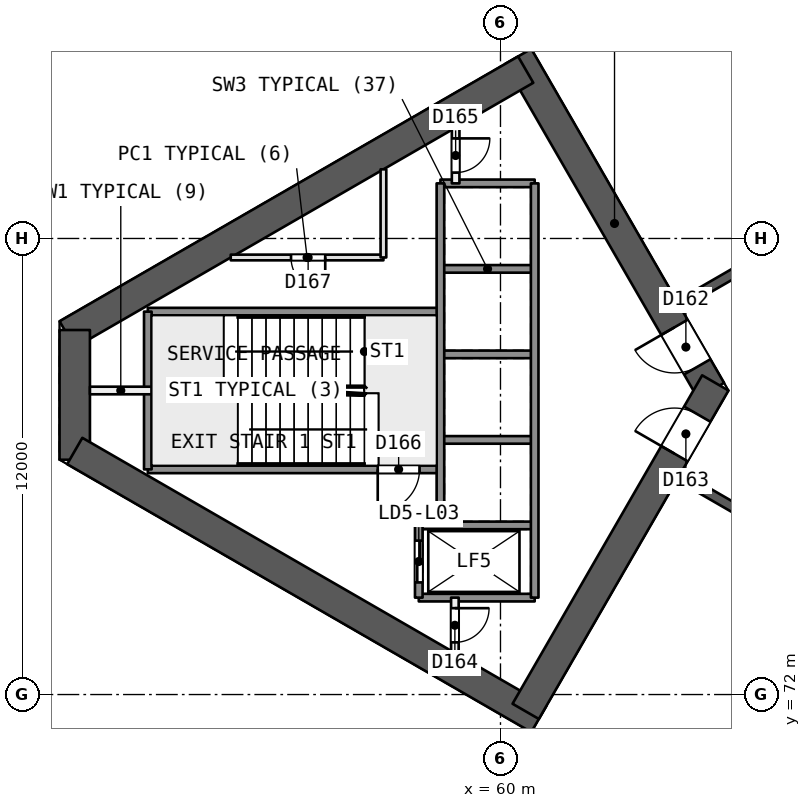
"""IFC4 building model, lengths in metres.
Left out: names, types, materials, properties, quantities, classifications, styles, units other than length and angle.
Written with IfcOpenShell. Run it as: python <this file> out.ifc"""

import sys

from ifc_helpers import new_model, si_unit, direction, frame, frame_2d, origin, place, context, subcontext, project, spatial, rectangle, extrude, element, fill, save


model = new_model("IFC4")
c1 = context("Model", 3, precision=1e-05, world=origin(), true_north=direction((0.0, 1.0)))
c2 = subcontext(c1, "Body", "Model", "MODEL_VIEW")
j1 = project(units=[si_unit("LENGTHUNIT", "METRE"), si_unit("PLANEANGLEUNIT", "RADIAN")], contexts=[c1])
p1 = place(None, origin())
s1 = spatial("IfcSite", under=j1, at=p1, CompositionType="ELEMENT")
p2 = place(p1, origin())
s2 = spatial("IfcBuilding", under=s1, at=p2, CompositionType="ELEMENT")
p3 = place(p2, frame((0.0, 0.0, 20.4)))
s3 = spatial("IfcBuildingStorey", under=s2, at=p3, CompositionType="ELEMENT", Elevation=20.4)
p4 = place(p3, frame((65.538, 80.0, 0.0), z_axis=(0.0, 0.0, 1.0), x_axis=(-0.49999662545, 0.866027352073, 0.0)))
e1 = element("IfcWall", 1, at=p4, inside=s3, PredefinedType="SHEAR", context=c2, shape_type="SweptSolid", body=[
    extrude(rectangle(XDim=10.149, YDim=0.8, at=frame_2d((5.074, 0.0))), origin(), (0.0, 0.0, 1.0), 5.0),
])
p5 = place(p4, frame((0.719, 0.0, 0.0)))
e2 = element("IfcOpeningElement", 2, at=p5, cuts=e1, PredefinedType="OPENING", context=c2, shape_type="SweptSolid", body=[
    extrude(rectangle(XDim=1.2, YDim=2.1, at=frame_2d((0.6, 1.05))), frame((0.0, 0.411, 0.0), z_axis=(0.0, -1.0, 0.0), x_axis=(1.0, 0.0, 0.0)), (0.0, 0.0, 1.0), 0.821),
])
p6 = place(p3, frame((60.664, 88.443, 0.0), z_axis=(0.0, 0.0, 1.0), x_axis=(-0.866029478545, -0.499992942241, 0.0)))
e3 = element("IfcWall", 3, at=p6, inside=s3, PredefinedType="SHEAR", context=c2, shape_type="SweptSolid", body=[
    extrude(rectangle(XDim=13.933, YDim=0.8, at=frame_2d((6.967, 0.0))), origin(), (0.0, 0.0, 1.0), 5.0),
])
p7 = place(p3, frame((48.797, 81.592, 0.0), z_axis=(0.0, 0.0, 1.0), x_axis=(0.0, -1.0, 0.0)))
e4 = element("IfcWall", 4, at=p7, inside=s3, PredefinedType="SHEAR", context=c2, shape_type="SweptSolid", body=[
    extrude(rectangle(XDim=3.415, YDim=0.8, at=frame_2d((1.707, 0.0))), origin(), (0.0, 0.0, 1.0), 5.0),
])
p8 = place(p3, frame((48.797, 78.408, 0.0), z_axis=(0.0, 0.0, 1.0), x_axis=(0.866032504327, -0.499987701298, 0.0)))
e5 = element("IfcWall", 5, at=p8, inside=s3, PredefinedType="SHEAR", context=c2, shape_type="SweptSolid", body=[
    extrude(rectangle(XDim=14.102, YDim=0.8, at=frame_2d((7.051, 0.0))), origin(), (0.0, 0.0, 1.0), 5.0),
])
p9 = place(p3, frame((60.664, 71.557, 0.0), z_axis=(0.0, 0.0, 1.0), x_axis=(0.50000409368, 0.866023040284, 0.0)))
e6 = element("IfcWall", 6, at=p9, inside=s3, PredefinedType="SHEAR", context=c2, shape_type="SweptSolid", body=[
    extrude(rectangle(XDim=9.98, YDim=0.8, at=frame_2d((4.99, 0.0))), origin(), (0.0, 0.0, 1.0), 5.0),
])
p10 = place(p9, frame((7.83, 0.0, 0.0)))
e7 = element("IfcOpeningElement", 7, at=p10, cuts=e6, PredefinedType="OPENING", context=c2, shape_type="SweptSolid", body=[
    extrude(rectangle(XDim=1.2, YDim=2.1, at=frame_2d((0.6, 1.05))), frame((0.0, 0.411, 0.0), z_axis=(0.0, -1.0, 0.0), x_axis=(1.0, 0.0, 0.0)), (0.0, 0.0, 1.0), 0.821),
])
p11 = place(p3, frame((78.2, 90.046, 0.0), z_axis=(0.0, 0.0, 1.0), x_axis=(-0.866026492143, -0.499998114903, 0.0)))
e8 = element("IfcWall", 8, at=p11, inside=s3, PredefinedType="SHEAR", context=c2, shape_type="SweptSolid", body=[
    extrude(rectangle(XDim=15.588, YDim=0.25, at=frame_2d((7.794, 0.0))), origin(), (0.0, 0.0, 1.0), 4.5),
])
p12 = place(p11, frame((2.518, 0.0, 0.0)))
e9 = element("IfcOpeningElement", 9, at=p12, cuts=e8, PredefinedType="OPENING", context=c2, shape_type="SweptSolid", body=[
    extrude(rectangle(XDim=1.2, YDim=2.4, at=frame_2d((0.6, 1.2))), frame((0.0, 0.135, 0.0), z_axis=(0.0, -1.0, 0.0), x_axis=(1.0, 0.0, 0.0)), (0.0, 0.0, 1.0), 0.271),
])
p13 = place(p11, frame((6.487, 0.0, 0.0)))
e10 = element("IfcOpeningElement", 10, at=p13, cuts=e8, PredefinedType="OPENING", context=c2, shape_type="SweptSolid", body=[
    extrude(rectangle(XDim=0.9, YDim=2.1, at=frame_2d((0.45, 1.05))), frame((0.0, 0.135, 0.0), z_axis=(0.0, -1.0, 0.0), x_axis=(1.0, 0.0, 0.0)), (0.0, 0.0, 1.0), 0.271),
])
p14 = place(p11, frame((7.89, 0.0, 0.0)))
e11 = element("IfcOpeningElement", 11, at=p14, cuts=e8, PredefinedType="OPENING", context=c2, shape_type="SweptSolid", body=[
    extrude(rectangle(XDim=0.9, YDim=2.1, at=frame_2d((0.45, 1.05))), frame((0.0, 0.135, 0.0), z_axis=(0.0, -1.0, 0.0), x_axis=(1.0, 0.0, 0.0)), (0.0, 0.0, 1.0), 0.271),
])
p15 = place(p11, frame((9.527, 0.0, 0.0)))
e12 = element("IfcOpeningElement", 12, at=p15, cuts=e8, PredefinedType="OPENING", context=c2, shape_type="SweptSolid", body=[
    extrude(rectangle(XDim=0.9, YDim=2.1, at=frame_2d((0.45, 1.05))), frame((0.0, 0.135, 0.0), z_axis=(0.0, -1.0, 0.0), x_axis=(1.0, 0.0, 0.0)), (0.0, 0.0, 1.0), 0.271),
])
p16 = place(p11, frame((12.65, 0.0, 0.0)))
e13 = element("IfcOpeningElement", 13, at=p16, cuts=e8, PredefinedType="OPENING", context=c2, shape_type="SweptSolid", body=[
    extrude(rectangle(XDim=1.2, YDim=2.4, at=frame_2d((0.6, 1.2))), frame((0.0, 0.135, 0.0), z_axis=(0.0, -1.0, 0.0), x_axis=(1.0, 0.0, 0.0)), (0.0, 0.0, 1.0), 0.271),
])
p17 = place(p3, frame((64.7, 77.748, 0.0), z_axis=(0.0, 0.0, 1.0), x_axis=(0.866026492143, -0.499998114903, 0.0)))
e14 = element("IfcWall", 14, at=p17, inside=s3, PredefinedType="SHEAR", context=c2, shape_type="SweptSolid", body=[
    extrude(rectangle(XDim=15.588, YDim=0.25, at=frame_2d((7.794, 0.0))), origin(), (0.0, 0.0, 1.0), 4.5),
])
p18 = place(p17, frame((3.297, 0.0, 0.0)))
e15 = element("IfcOpeningElement", 15, at=p18, cuts=e14, PredefinedType="OPENING", context=c2, shape_type="SweptSolid", body=[
    extrude(rectangle(XDim=1.2, YDim=2.4, at=frame_2d((0.6, 1.2))), frame((0.0, 0.135, 0.0), z_axis=(0.0, -1.0, 0.0), x_axis=(1.0, 0.0, 0.0)), (0.0, 0.0, 1.0), 0.271),
])
p19 = place(p17, frame((9.143, 0.0, 0.0)))
e16 = element("IfcOpeningElement", 16, at=p19, cuts=e14, PredefinedType="OPENING", context=c2, shape_type="SweptSolid", body=[
    extrude(rectangle(XDim=1.2, YDim=2.4, at=frame_2d((0.6, 1.2))), frame((0.0, 0.135, 0.0), z_axis=(0.0, -1.0, 0.0), x_axis=(1.0, 0.0, 0.0)), (0.0, 0.0, 1.0), 0.271),
])
p20 = place(p17, frame((13.04, 0.0, 0.0)))
e17 = element("IfcOpeningElement", 17, at=p20, cuts=e14, PredefinedType="OPENING", context=c2, shape_type="SweptSolid", body=[
    extrude(rectangle(XDim=1.2, YDim=2.4, at=frame_2d((0.6, 1.2))), frame((0.0, 0.135, 0.0), z_axis=(0.0, -1.0, 0.0), x_axis=(1.0, 0.0, 0.0)), (0.0, 0.0, 1.0), 0.271),
])
for number, where, z_axis, x_axis in (
    (18, (60.85, 55.491, 0.0), (0.0, 0.0, 1.0), (0.5, 0.866, 0.0)),
    (19, (64.225, 53.542, 0.0), (0.0, 0.0, 1.0), (0.5, 0.866, 0.0)),
):
    element("IfcWall", number, at=place(p3, frame(where, z_axis=z_axis, x_axis=x_axis)), inside=s3, PredefinedType="PARTITIONING", context=c2, shape_type="SweptSolid", body=[
        extrude(rectangle(XDim=21.201, YDim=0.2, at=frame_2d((10.601, 0.0))), origin(), (0.0, 0.0, 1.0), 4.5),
    ])
p21 = place(p3, frame((26.66, 85.0, 0.0), z_axis=(0.0, 0.0, 1.0), x_axis=(0.866025599265, 0.499999661418, 0.0)))
e20 = element("IfcWall", 20, at=p21, inside=s3, PredefinedType="SOLIDWALL", context=c2, shape_type="SweptSolid", body=[
    extrude(rectangle(XDim=78.727, YDim=0.4, at=frame_2d((39.364, 0.0))), origin(), (0.0, 0.0, 1.0), 4.5),
])
p22 = place(p21, frame((42.84, 0.0, 0.9)))
e21 = element("IfcOpeningElement", 21, at=p22, cuts=e20, PredefinedType="OPENING", context=c2, shape_type="SweptSolid", body=[
    extrude(rectangle(XDim=2.4, YDim=2.4, at=frame_2d((1.2, 1.2))), frame((0.0, 0.21, 0.0), z_axis=(0.0, -1.0, 0.0), x_axis=(1.0, 0.0, 0.0)), (0.0, 0.0, 1.0), 0.421),
])
p23 = place(p21, frame((37.385, 0.0, 0.9)))
e22 = element("IfcOpeningElement", 22, at=p23, cuts=e20, PredefinedType="OPENING", context=c2, shape_type="SweptSolid", body=[
    extrude(rectangle(XDim=2.4, YDim=2.4, at=frame_2d((1.2, 1.2))), frame((0.0, 0.21, 0.0), z_axis=(0.0, -1.0, 0.0), x_axis=(1.0, 0.0, 0.0)), (0.0, 0.0, 1.0), 0.421),
])
p24 = place(p21, frame((32.708, 0.0, 0.9)))
e23 = element("IfcOpeningElement", 23, at=p24, cuts=e20, PredefinedType="OPENING", context=c2, shape_type="SweptSolid", body=[
    extrude(rectangle(XDim=2.4, YDim=2.4, at=frame_2d((1.2, 1.2))), frame((0.0, 0.21, 0.0), z_axis=(0.0, -1.0, 0.0), x_axis=(1.0, 0.0, 0.0)), (0.0, 0.0, 1.0), 0.421),
])
p25 = place(p3, frame((94.84, 35.636, 0.0), z_axis=(0.0, 0.0, 1.0), x_axis=(-0.866025599265, 0.499999661418, 0.0)))
e24 = element("IfcWall", 24, at=p25, inside=s3, PredefinedType="SOLIDWALL", context=c2, shape_type="SweptSolid", body=[
    extrude(rectangle(XDim=78.727, YDim=0.4, at=frame_2d((39.364, 0.0))), origin(), (0.0, 0.0, 1.0), 4.5),
])
p26 = place(p25, frame((42.061, 0.0, 0.9)))
e25 = element("IfcOpeningElement", 25, at=p26, cuts=e24, PredefinedType="OPENING", context=c2, shape_type="SweptSolid", body=[
    extrude(rectangle(XDim=2.4, YDim=2.4, at=frame_2d((1.2, 1.2))), frame((0.0, 0.21, 0.0), z_axis=(0.0, -1.0, 0.0), x_axis=(1.0, 0.0, 0.0)), (0.0, 0.0, 1.0), 0.421),
])
p27 = place(p25, frame((36.215, 0.0, 0.9)))
e26 = element("IfcOpeningElement", 26, at=p27, cuts=e24, PredefinedType="OPENING", context=c2, shape_type="SweptSolid", body=[
    extrude(rectangle(XDim=2.4, YDim=2.4, at=frame_2d((1.2, 1.2))), frame((0.0, 0.21, 0.0), z_axis=(0.0, -1.0, 0.0), x_axis=(1.0, 0.0, 0.0)), (0.0, 0.0, 1.0), 0.421),
])
p28 = place(p25, frame((32.318, 0.0, 0.9)))
e27 = element("IfcOpeningElement", 27, at=p28, cuts=e24, PredefinedType="OPENING", context=c2, shape_type="SweptSolid", body=[
    extrude(rectangle(XDim=2.4, YDim=2.4, at=frame_2d((1.2, 1.2))), frame((0.0, 0.21, 0.0), z_axis=(0.0, -1.0, 0.0), x_axis=(1.0, 0.0, 0.0)), (0.0, 0.0, 1.0), 0.421),
])
p29 = place(p3, frame((60.9, 85.45, 0.0), z_axis=(0.0, 0.0, 1.0), x_axis=(-1.0, 0.0, 0.0)))
e28 = element("IfcWall", 28, at=p29, inside=s3, PredefinedType="SOLIDWALL", context=c2, shape_type="SweptSolid", body=[
    extrude(rectangle(XDim=2.48, YDim=0.2, at=frame_2d((1.24, 0.0))), origin(), (0.0, 0.0, 1.0), 4.5),
])
p30 = place(p3, frame((56.92, 83.5, 0.0), z_axis=(0.0, 0.0, 1.0), x_axis=(-1.0, 0.0, 0.0)))
e29 = element("IfcWall", 29, at=p30, inside=s3, PredefinedType="PARTITIONING", context=c2, shape_type="SweptSolid", body=[
    extrude(rectangle(XDim=4.018, YDim=0.15, at=frame_2d((2.009, 0.0))), origin(), (0.0, 0.0, 1.0), 4.5),
])
p31 = place(p30, frame((1.531, 0.0, 0.0)))
e30 = element("IfcOpeningElement", 30, at=p31, cuts=e29, PredefinedType="OPENING", context=c2, shape_type="SweptSolid", body=[
    extrude(rectangle(XDim=0.9, YDim=2.1, at=frame_2d((0.45, 1.05))), frame((0.0, 0.085, 0.0), z_axis=(0.0, -1.0, 0.0), x_axis=(1.0, 0.0, 0.0)), (0.0, 0.0, 1.0), 0.171),
])
p32 = place(p3, frame((60.9, 83.2, 0.0), z_axis=(0.0, 0.0, 1.0), x_axis=(-1.0, 0.0, 0.0)))
e31 = element("IfcWall", 31, at=p32, inside=s3, PredefinedType="SOLIDWALL", context=c2, shape_type="SweptSolid", body=[
    extrude(rectangle(XDim=2.48, YDim=0.2, at=frame_2d((1.24, 0.0))), origin(), (0.0, 0.0, 1.0), 4.5),
])
p33 = place(p3, frame((58.42, 82.075, 0.0), z_axis=(0.0, 0.0, 1.0), x_axis=(-1.0, 0.0, 0.0)))
e32 = element("IfcWall", 32, at=p33, inside=s3, PredefinedType="SOLIDWALL", context=c2, shape_type="SweptSolid", body=[
    extrude(rectangle(XDim=7.7, YDim=0.2, at=frame_2d((3.85, 0.0))), origin(), (0.0, 0.0, 1.0), 4.5),
])
p34 = place(p3, frame((60.9, 80.95, 0.0), z_axis=(0.0, 0.0, 1.0), x_axis=(-1.0, 0.0, 0.0)))
e33 = element("IfcWall", 33, at=p34, inside=s3, PredefinedType="SOLIDWALL", context=c2, shape_type="SweptSolid", body=[
    extrude(rectangle(XDim=2.48, YDim=0.2, at=frame_2d((1.24, 0.0))), origin(), (0.0, 0.0, 1.0), 4.5),
])
p35 = place(p3, frame((50.82, 80.0, 0.0), z_axis=(0.0, 0.0, 1.0), x_axis=(-1.0, 0.0, 0.0)))
e34 = element("IfcWall", 34, at=p35, inside=s3, PredefinedType="PARTITIONING", context=c2, shape_type="SweptSolid", body=[
    extrude(rectangle(XDim=1.623, YDim=0.2, at=frame_2d((0.812, 0.0))), origin(), (0.0, 0.0, 1.0), 4.5),
])
p36 = place(p3, frame((60.9, 78.7, 0.0), z_axis=(0.0, 0.0, 1.0), x_axis=(-1.0, 0.0, 0.0)))
e35 = element("IfcWall", 35, at=p36, inside=s3, PredefinedType="SOLIDWALL", context=c2, shape_type="SweptSolid", body=[
    extrude(rectangle(XDim=2.48, YDim=0.2, at=frame_2d((1.24, 0.0))), origin(), (0.0, 0.0, 1.0), 4.5),
])
p37 = place(p3, frame((58.42, 77.925, 0.0), z_axis=(0.0, 0.0, 1.0), x_axis=(-1.0, 0.0, 0.0)))
e36 = element("IfcWall", 36, at=p37, inside=s3, PredefinedType="SOLIDWALL", context=c2, shape_type="SweptSolid", body=[
    extrude(rectangle(XDim=7.7, YDim=0.2, at=frame_2d((3.85, 0.0))), origin(), (0.0, 0.0, 1.0), 4.5),
])
p38 = place(p37, frame((0.55, 0.0, 0.0)))
e37 = element("IfcOpeningElement", 37, at=p38, cuts=e36, PredefinedType="OPENING", context=c2, shape_type="SweptSolid", body=[
    extrude(rectangle(XDim=1.1, YDim=2.1, at=frame_2d((0.55, 1.05))), frame((0.0, 0.11, 0.0), z_axis=(0.0, -1.0, 0.0), x_axis=(1.0, 0.0, 0.0)), (0.0, 0.0, 1.0), 0.221),
])
for number, where, z_axis, x_axis in (
    (38, (60.9, 76.45, 0.0), (0.0, 0.0, 1.0), (-1.0, 0.0, 0.0)),
    (39, (60.9, 74.55, 0.0), (0.0, 0.0, 1.0), (-1.0, 0.0, 0.0)),
):
    element("IfcWall", number, at=place(p3, frame(where, z_axis=z_axis, x_axis=x_axis)), inside=s3, PredefinedType="SOLIDWALL", context=c2, shape_type="SweptSolid", body=[
        extrude(rectangle(XDim=3.05, YDim=0.2, at=frame_2d((1.525, 0.0))), origin(), (0.0, 0.0, 1.0), 4.5),
    ])
p39 = place(p3, frame((60.9, 85.45, 0.0), z_axis=(0.0, 0.0, 1.0), x_axis=(0.0, -1.0, 0.0)))
e40 = element("IfcWall", 40, at=p39, inside=s3, PredefinedType="SOLIDWALL", context=c2, shape_type="SweptSolid", body=[
    extrude(rectangle(XDim=10.9, YDim=0.2, at=frame_2d((5.45, 0.0))), origin(), (0.0, 0.0, 1.0), 4.5),
])
p40 = place(p3, frame((58.82, 86.917, 0.0), z_axis=(0.0, 0.0, 1.0), x_axis=(0.0, -1.0, 0.0)))
e41 = element("IfcWall", 41, at=p40, inside=s3, PredefinedType="PARTITIONING", context=c2, shape_type="SweptSolid", body=[
    extrude(rectangle(XDim=1.467, YDim=0.2, at=frame_2d((0.733, 0.0))), origin(), (0.0, 0.0, 1.0), 4.5),
])
p41 = place(p40, frame((0.283, 0.0, 0.0)))
e42 = element("IfcOpeningElement", 42, at=p41, cuts=e41, PredefinedType="OPENING", context=c2, shape_type="SweptSolid", body=[
    extrude(rectangle(XDim=0.9, YDim=2.1, at=frame_2d((0.45, 1.05))), frame((0.0, 0.11, 0.0), z_axis=(0.0, -1.0, 0.0), x_axis=(1.0, 0.0, 0.0)), (0.0, 0.0, 1.0), 0.221),
])
p42 = place(p3, frame((58.8, 74.55, 0.0), z_axis=(0.0, 0.0, 1.0), x_axis=(0.0, -1.0, 0.0)))
e43 = element("IfcWall", 43, at=p42, inside=s3, PredefinedType="PARTITIONING", context=c2, shape_type="SweptSolid", body=[
    extrude(rectangle(XDim=1.455, YDim=0.2, at=frame_2d((0.728, 0.0))), origin(), (0.0, 0.0, 1.0), 4.5),
])
p43 = place(p42, frame((0.278, 0.0, 0.0)))
e44 = element("IfcOpeningElement", 44, at=p43, cuts=e43, PredefinedType="OPENING", context=c2, shape_type="SweptSolid", body=[
    extrude(rectangle(XDim=0.9, YDim=2.1, at=frame_2d((0.45, 1.05))), frame((0.0, 0.11, 0.0), z_axis=(0.0, -1.0, 0.0), x_axis=(1.0, 0.0, 0.0)), (0.0, 0.0, 1.0), 0.221),
])
p44 = place(p3, frame((58.42, 85.45, 0.0), z_axis=(0.0, 0.0, 1.0), x_axis=(0.0, -1.0, 0.0)))
e45 = element("IfcWall", 45, at=p44, inside=s3, PredefinedType="SOLIDWALL", context=c2, shape_type="SweptSolid", body=[
    extrude(rectangle(XDim=9.0, YDim=0.2, at=frame_2d((4.5, 0.0))), origin(), (0.0, 0.0, 1.0), 4.5),
])
p45 = place(p3, frame((57.85, 76.45, 0.0), z_axis=(0.0, 0.0, 1.0), x_axis=(0.0, -1.0, 0.0)))
e46 = element("IfcWall", 46, at=p45, inside=s3, PredefinedType="SOLIDWALL", context=c2, shape_type="SweptSolid", body=[
    extrude(rectangle(XDim=1.9, YDim=0.2, at=frame_2d((0.95, 0.0))), origin(), (0.0, 0.0, 1.0), 4.5),
])
p46 = place(p45, frame((0.4, 0.0, 0.0)))
e47 = element("IfcOpeningElement", 47, at=p46, cuts=e46, PredefinedType="OPENING", context=c2, shape_type="SweptSolid", body=[
    extrude(rectangle(XDim=1.1, YDim=2.1, at=frame_2d((0.55, 1.05))), frame((0.0, 0.11, 0.0), z_axis=(0.0, -1.0, 0.0), x_axis=(1.0, 0.0, 0.0)), (0.0, 0.0, 1.0), 0.221),
])
p47 = place(p3, frame((56.92, 85.82, 0.0), z_axis=(0.0, 0.0, 1.0), x_axis=(0.0, -1.0, 0.0)))
e48 = element("IfcWall", 48, at=p47, inside=s3, PredefinedType="PARTITIONING", context=c2, shape_type="SweptSolid", body=[
    extrude(rectangle(XDim=2.32, YDim=0.15, at=frame_2d((1.16, 0.0))), origin(), (0.0, 0.0, 1.0), 4.5),
])
p48 = place(p3, frame((50.72, 82.075, 0.0), z_axis=(0.0, 0.0, 1.0), x_axis=(0.0, -1.0, 0.0)))
e49 = element("IfcWall", 49, at=p48, inside=s3, PredefinedType="SOLIDWALL", context=c2, shape_type="SweptSolid", body=[
    extrude(rectangle(XDim=4.15, YDim=0.2, at=frame_2d((2.075, 0.0))), origin(), (0.0, 0.0, 1.0), 4.5),
])
p49 = place(p5, origin())
e50 = element("IfcDoor", 50, at=p49, inside=s3, OperationType="SINGLE_SWING_RIGHT", PredefinedType="NOTDEFINED", context=c2, shape_type="SweptSolid", body=[
    extrude(rectangle(XDim=1.2, YDim=2.1, at=frame_2d((0.6, 1.05))), frame((0.0, 0.025, 0.0), z_axis=(0.0, -1.0, 0.0), x_axis=(1.0, 0.0, 0.0)), (0.0, 0.0, 1.0), 0.05),
])
fill(e2, e50)
p50 = place(p10, origin())
e51 = element("IfcDoor", 51, at=p50, inside=s3, OperationType="SINGLE_SWING_LEFT", PredefinedType="NOTDEFINED", context=c2, shape_type="SweptSolid", body=[
    extrude(rectangle(XDim=1.2, YDim=2.1, at=frame_2d((0.6, 1.05))), frame((0.0, 0.025, 0.0), z_axis=(0.0, -1.0, 0.0), x_axis=(1.0, 0.0, 0.0)), (0.0, 0.0, 1.0), 0.05),
])
fill(e7, e51)
p51 = place(p46, origin())
e52 = element("IfcDoor", 52, at=p51, inside=s3, OperationType="SLIDING_TO_RIGHT", PredefinedType="NOTDEFINED", context=c2, shape_type="SweptSolid", body=[
    extrude(rectangle(XDim=1.1, YDim=2.1, at=frame_2d((0.55, 1.05))), frame((0.0, 0.025, 0.0), z_axis=(0.0, -1.0, 0.0), x_axis=(1.0, 0.0, 0.0)), (0.0, 0.0, 1.0), 0.05),
])
fill(e47, e52)
p52 = place(p43, origin())
e53 = element("IfcDoor", 53, at=p52, inside=s3, OperationType="SINGLE_SWING_LEFT", PredefinedType="NOTDEFINED", context=c2, shape_type="SweptSolid", body=[
    extrude(rectangle(XDim=0.9, YDim=2.1, at=frame_2d((0.45, 1.05))), frame((0.0, 0.025, 0.0), z_axis=(0.0, -1.0, 0.0), x_axis=(1.0, 0.0, 0.0)), (0.0, 0.0, 1.0), 0.05),
])
fill(e44, e53)
p53 = place(p41, origin())
e54 = element("IfcDoor", 54, at=p53, inside=s3, OperationType="SINGLE_SWING_LEFT", PredefinedType="NOTDEFINED", context=c2, shape_type="SweptSolid", body=[
    extrude(rectangle(XDim=0.9, YDim=2.1, at=frame_2d((0.45, 1.05))), frame((0.0, 0.025, 0.0), z_axis=(0.0, -1.0, 0.0), x_axis=(1.0, 0.0, 0.0)), (0.0, 0.0, 1.0), 0.05),
])
fill(e42, e54)
p54 = place(p38, origin())
e55 = element("IfcDoor", 55, at=p54, inside=s3, OperationType="SINGLE_SWING_RIGHT", PredefinedType="NOTDEFINED", context=c2, shape_type="SweptSolid", body=[
    extrude(rectangle(XDim=1.1, YDim=2.1, at=frame_2d((0.55, 1.05))), frame((0.0, 0.025, 0.0), z_axis=(0.0, -1.0, 0.0), x_axis=(1.0, 0.0, 0.0)), (0.0, 0.0, 1.0), 0.05),
])
fill(e37, e55)
p55 = place(p31, origin())
e56 = element("IfcDoor", 56, at=p55, inside=s3, OperationType="SINGLE_SWING_LEFT", PredefinedType="NOTDEFINED", context=c2, shape_type="SweptSolid", body=[
    extrude(rectangle(XDim=0.9, YDim=2.1, at=frame_2d((0.45, 1.05))), frame((0.0, 0.025, 0.0), z_axis=(0.0, -1.0, 0.0), x_axis=(1.0, 0.0, 0.0)), (0.0, 0.0, 1.0), 0.05),
])
fill(e30, e56)
save(model, sys.argv[1])
